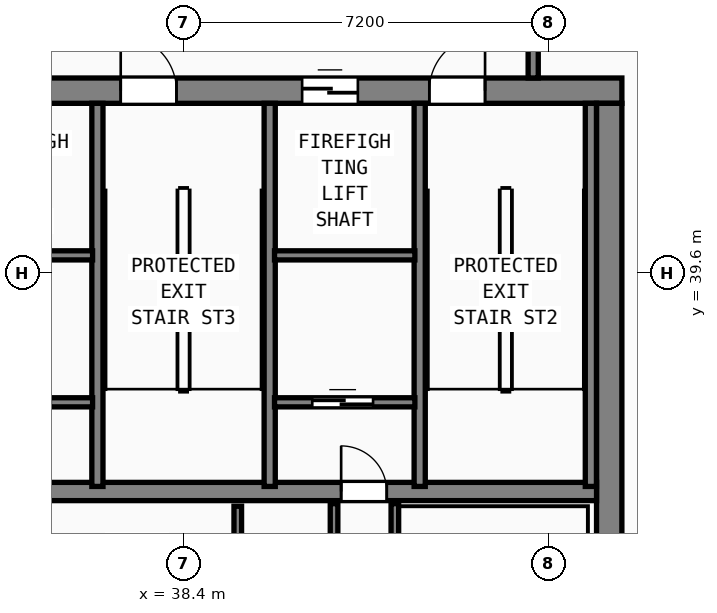
"""IFC4 building model, lengths in metres.
Left out: names, types, materials, properties, quantities, classifications, styles, units other than length and angle.
Written with IfcOpenShell. Run it as: python <this file> out.ifc"""

import sys

from ifc_helpers import new_model, si_unit, direction, frame, frame_2d, origin, place, context, subcontext, project, spatial, rectangle, extrude, element, fill, save


model = new_model("IFC4")
c1 = context("Model", 3, precision=1e-05, world=origin(), true_north=direction((0.0, 1.0)))
c2 = subcontext(c1, "Body", "Model", "MODEL_VIEW")
j1 = project(units=[si_unit("LENGTHUNIT", "METRE"), si_unit("PLANEANGLEUNIT", "RADIAN")], contexts=[c1])
p1 = place(None, origin())
s1 = spatial("IfcSite", under=j1, at=p1, CompositionType="ELEMENT")
p2 = place(p1, origin())
s2 = spatial("IfcBuilding", under=s1, at=p2, CompositionType="ELEMENT")
p3 = place(p2, frame((0.0, 0.0, 323.2)))
s3 = spatial("IfcBuildingStorey", under=s2, at=p3, CompositionType="ELEMENT", Elevation=323.2)
p4 = place(p3, frame((29.75, 43.2, 0.0), z_axis=(0.0, 0.0, 1.0), x_axis=(1.0, 0.0, 0.0)))
e1 = element("IfcWall", 1, at=p4, inside=s3, PredefinedType="SHEAR", context=c2, shape_type="SweptSolid", body=[
    extrude(rectangle(XDim=17.3, YDim=0.5, at=frame_2d((8.65, 0.0))), origin(), (0.0, 0.0, 1.0), 4.75),
])
p5 = place(p4, frame((2.3, 0.0, 0.0)))
e2 = element("IfcOpeningElement", 2, at=p5, cuts=e1, PredefinedType="OPENING", context=c2, shape_type="SweptSolid", body=[
    extrude(rectangle(XDim=1.1, YDim=2.15, at=frame_2d((0.55, 1.075))), frame((0.0, 0.26, 0.0), z_axis=(0.0, -1.0, 0.0), x_axis=(1.0, 0.0, 0.0)), (0.0, 0.0, 1.0), 0.52),
])
p6 = place(p4, frame((7.41, 0.0, 0.0)))
e3 = element("IfcOpeningElement", 3, at=p6, cuts=e1, PredefinedType="OPENING", context=c2, shape_type="SweptSolid", body=[
    extrude(rectangle(XDim=1.1, YDim=2.15, at=frame_2d((0.55, 1.075))), frame((0.0, 0.26, 0.0), z_axis=(0.0, -1.0, 0.0), x_axis=(1.0, 0.0, 0.0)), (0.0, 0.0, 1.0), 0.52),
])
p7 = place(p4, frame((13.5, 0.0, 0.0)))
e4 = element("IfcOpeningElement", 4, at=p7, cuts=e1, PredefinedType="OPENING", context=c2, shape_type="SweptSolid", body=[
    extrude(rectangle(XDim=1.1, YDim=2.15, at=frame_2d((0.55, 1.075))), frame((0.0, 0.26, 0.0), z_axis=(0.0, -1.0, 0.0), x_axis=(1.0, 0.0, 0.0)), (0.0, 0.0, 1.0), 0.52),
])
p8 = place(p4, frame((4.63, 0.0, 0.0)))
e5 = element("IfcOpeningElement", 5, at=p8, cuts=e1, PredefinedType="OPENING", context=c2, shape_type="SweptSolid", body=[
    extrude(rectangle(XDim=1.1, YDim=2.2, at=frame_2d((0.55, 1.1))), frame((0.0, 0.26, 0.0), z_axis=(0.0, -1.0, 0.0), x_axis=(1.0, 0.0, 0.0)), (0.0, 0.0, 1.0), 0.52),
])
p9 = place(p4, frame((10.99, 0.0, 0.0)))
e6 = element("IfcOpeningElement", 6, at=p9, cuts=e1, PredefinedType="OPENING", context=c2, shape_type="SweptSolid", body=[
    extrude(rectangle(XDim=1.1, YDim=2.2, at=frame_2d((0.55, 1.1))), frame((0.0, 0.26, 0.0), z_axis=(0.0, -1.0, 0.0), x_axis=(1.0, 0.0, 0.0)), (0.0, 0.0, 1.0), 0.52),
])
p10 = place(p3, frame((46.8, 32.8, 0.0), z_axis=(0.0, 0.0, 1.0), x_axis=(0.0, 1.0, 0.0)))
e7 = element("IfcWall", 7, at=p10, inside=s3, PredefinedType="SHEAR", context=c2, shape_type="SweptSolid", body=[
    extrude(rectangle(XDim=10.15, YDim=0.5, at=frame_2d((5.075, 0.0))), origin(), (0.0, 0.0, 1.0), 4.75),
])
p11 = place(p3, frame((30.25, 35.29, 0.0), z_axis=(0.0, 0.0, 1.0), x_axis=(1.0, 0.0, 0.0)))
e8 = element("IfcWall", 8, at=p11, inside=s3, PredefinedType="SHEAR", context=c2, shape_type="SweptSolid", body=[
    extrude(rectangle(XDim=16.3, YDim=0.36, at=frame_2d((8.15, 0.0))), origin(), (0.0, 0.0, 1.0), 4.75),
])
p12 = place(p11, frame((5.1, 0.0, 0.0), z_axis=(0.0, 0.0, 1.0), x_axis=(-1.0, 0.0, 0.0)))
e9 = element("IfcOpeningElement", 9, at=p12, cuts=e8, PredefinedType="OPENING", context=c2, shape_type="SweptSolid", body=[
    extrude(rectangle(XDim=0.9, YDim=2.1, at=frame_2d((0.45, 1.05))), frame((0.0, 0.19, 0.0), z_axis=(0.0, -1.0, 0.0), x_axis=(1.0, 0.0, 0.0)), (0.0, 0.0, 1.0), 0.38),
])
p13 = place(p11, frame((12.16, 0.0, 0.0), z_axis=(0.0, 0.0, 1.0), x_axis=(-1.0, 0.0, 0.0)))
e10 = element("IfcOpeningElement", 10, at=p13, cuts=e8, PredefinedType="OPENING", context=c2, shape_type="SweptSolid", body=[
    extrude(rectangle(XDim=0.9, YDim=2.1, at=frame_2d((0.45, 1.05))), frame((0.0, 0.19, 0.0), z_axis=(0.0, -1.0, 0.0), x_axis=(1.0, 0.0, 0.0)), (0.0, 0.0, 1.0), 0.38),
])
for number, where, z_axis, x_axis in (
    (11, (36.7, 35.39, 0.0), (0.0, 0.0, 1.0), (0.0, 1.0, 0.0)),
    (12, (40.1, 35.39, 0.0), (0.0, 0.0, 1.0), (0.0, 1.0, 0.0)),
    (13, (43.06, 35.39, 0.0), (0.0, 0.0, 1.0), (0.0, 1.0, 0.0)),
    (14, (46.438, 35.39, 0.0), (0.0, 0.0, 1.0), (0.0, 1.0, 0.0)),
):
    element("IfcWall", number, at=place(p3, frame(where, z_axis=z_axis, x_axis=x_axis)), inside=s3, PredefinedType="SHEAR", context=c2, shape_type="SweptSolid", body=[
        extrude(rectangle(XDim=7.56, YDim=0.22, at=frame_2d((3.78, 0.0))), origin(), (0.0, 0.0, 1.0), 4.75),
    ])
p14 = place(p3, frame((45.3, 43.45, 0.0), z_axis=(0.0, 0.0, 1.0), x_axis=(0.0, 1.0, 0.0)))
e15 = element("IfcWall", 15, at=p14, inside=s3, PredefinedType="SOLIDWALL", context=c2, shape_type="SweptSolid", body=[
    extrude(rectangle(XDim=2.445, YDim=0.2, at=frame_2d((1.223, 0.0))), origin(), (0.0, 0.0, 1.0), 4.75),
])
p15 = place(p14, frame((0.7, 0.0, 0.0)))
e16 = element("IfcOpeningElement", 16, at=p15, cuts=e15, PredefinedType="OPENING", context=c2, shape_type="SweptSolid", body=[
    extrude(rectangle(XDim=1.1, YDim=2.15, at=frame_2d((0.55, 1.075))), frame((0.0, 0.11, 0.0), z_axis=(0.0, -1.0, 0.0), x_axis=(1.0, 0.0, 0.0)), (0.0, 0.0, 1.0), 0.22),
])
for number, where, z_axis, x_axis in (
    (17, (33.835, 39.95, 0.0), (0.0, 0.0, 1.0), (1.0, 0.0, 0.0)),
    (18, (40.195, 39.95, 0.0), (0.0, 0.0, 1.0), (1.0, 0.0, 0.0)),
):
    element("IfcWall", number, at=place(p3, frame(where, z_axis=z_axis, x_axis=x_axis)), inside=s3, PredefinedType="SOLIDWALL", context=c2, shape_type="SweptSolid", body=[
        extrude(rectangle(XDim=2.77, YDim=0.18, at=frame_2d((1.385, 0.0))), origin(), (0.0, 0.0, 1.0), 4.75),
    ])
p16 = place(p3, frame((33.835, 37.05, 0.0), z_axis=(0.0, 0.0, 1.0), x_axis=(1.0, 0.0, 0.0)))
e19 = element("IfcWall", 19, at=p16, inside=s3, PredefinedType="SOLIDWALL", context=c2, shape_type="SweptSolid", body=[
    extrude(rectangle(XDim=2.77, YDim=0.18, at=frame_2d((1.385, 0.0))), origin(), (0.0, 0.0, 1.0), 4.75),
])
p17 = place(p16, frame((1.945, 0.0, 0.0), z_axis=(0.0, 0.0, 1.0), x_axis=(-1.0, 0.0, 0.0)))
e20 = element("IfcOpeningElement", 20, at=p17, cuts=e19, PredefinedType="OPENING", context=c2, shape_type="SweptSolid", body=[
    extrude(rectangle(XDim=1.2, YDim=2.2, at=frame_2d((0.6, 1.1))), frame((0.0, 0.1, 0.0), z_axis=(0.0, -1.0, 0.0), x_axis=(1.0, 0.0, 0.0)), (0.0, 0.0, 1.0), 0.2),
])
p18 = place(p3, frame((40.195, 37.05, 0.0), z_axis=(0.0, 0.0, 1.0), x_axis=(1.0, 0.0, 0.0)))
e21 = element("IfcWall", 21, at=p18, inside=s3, PredefinedType="SOLIDWALL", context=c2, shape_type="SweptSolid", body=[
    extrude(rectangle(XDim=2.77, YDim=0.18, at=frame_2d((1.385, 0.0))), origin(), (0.0, 0.0, 1.0), 4.75),
])
p19 = place(p18, frame((1.945, 0.0, 0.0), z_axis=(0.0, 0.0, 1.0), x_axis=(-1.0, 0.0, 0.0)))
e22 = element("IfcOpeningElement", 22, at=p19, cuts=e21, PredefinedType="OPENING", context=c2, shape_type="SweptSolid", body=[
    extrude(rectangle(XDim=1.2, YDim=2.2, at=frame_2d((0.6, 1.1))), frame((0.0, 0.1, 0.0), z_axis=(0.0, -1.0, 0.0), x_axis=(1.0, 0.0, 0.0)), (0.0, 0.0, 1.0), 0.2),
])
for number, where, z_axis, x_axis in (
    (23, (41.37, 32.88, 0.0), (0.0, 0.0, 1.0), (0.0, 1.0, 0.0)),
    (24, (42.57, 32.88, 0.0), (0.0, 0.0, 1.0), (0.0, 1.0, 0.0)),
):
    element("IfcWall", number, at=place(p3, frame(where, z_axis=z_axis, x_axis=x_axis)), inside=s3, PredefinedType="SOLIDWALL", context=c2, shape_type="SweptSolid", body=[
        extrude(rectangle(XDim=2.17, YDim=0.15, at=frame_2d((1.085, 0.0))), origin(), (0.0, 0.0, 1.0), 4.75),
    ])
p20 = place(p3, frame((39.47, 32.95, 0.0), z_axis=(0.0, 0.0, 1.0), x_axis=(0.0, 1.0, 0.0)))
e25 = element("IfcWall", 25, at=p20, inside=s3, PredefinedType="SOLIDWALL", context=c2, shape_type="SweptSolid", body=[
    extrude(rectangle(XDim=2.05, YDim=0.15, at=frame_2d((1.025, 0.0))), origin(), (0.0, 0.0, 1.0), 4.75),
])
p21 = place(p6, origin())
e26 = element("IfcDoor", 26, at=p21, inside=s3, OperationType="SINGLE_SWING_LEFT", PredefinedType="DOOR", context=c2, shape_type="SweptSolid", body=[
    extrude(rectangle(XDim=1.1, YDim=2.15, at=frame_2d((0.55, 1.075))), frame((0.0, 0.185, 0.0), z_axis=(0.0, -1.0, 0.0), x_axis=(1.0, 0.0, 0.0)), (0.0, 0.0, 1.0), 0.05),
])
fill(e3, e26)
p22 = place(p7, origin())
e27 = element("IfcDoor", 27, at=p22, inside=s3, OperationType="SINGLE_SWING_RIGHT", PredefinedType="DOOR", context=c2, shape_type="SweptSolid", body=[
    extrude(rectangle(XDim=1.1, YDim=2.15, at=frame_2d((0.55, 1.075))), frame((0.0, 0.185, 0.0), z_axis=(0.0, -1.0, 0.0), x_axis=(1.0, 0.0, 0.0)), (0.0, 0.0, 1.0), 0.05),
])
fill(e4, e27)
p23 = place(p9, origin())
e28 = element("IfcDoor", 28, at=p23, inside=s3, OperationType="SLIDING_TO_LEFT", PredefinedType="DOOR", context=c2, shape_type="SweptSolid", body=[
    extrude(rectangle(XDim=1.1, YDim=2.2, at=frame_2d((0.55, 1.1))), frame((0.0, 0.185, 0.0), z_axis=(0.0, -1.0, 0.0), x_axis=(1.0, 0.0, 0.0)), (0.0, 0.0, 1.0), 0.05),
])
fill(e6, e28)
p24 = place(p19, origin())
e29 = element("IfcDoor", 29, at=p24, inside=s3, OperationType="SLIDING_TO_RIGHT", PredefinedType="DOOR", context=c2, shape_type="SweptSolid", body=[
    extrude(rectangle(XDim=1.2, YDim=2.2, at=frame_2d((0.6, 1.1))), frame((0.0, 0.025, 0.0), z_axis=(0.0, -1.0, 0.0), x_axis=(1.0, 0.0, 0.0)), (0.0, 0.0, 1.0), 0.05),
])
fill(e22, e29)
p25 = place(p13, origin())
e30 = element("IfcDoor", 30, at=p25, inside=s3, OperationType="SINGLE_SWING_RIGHT", PredefinedType="DOOR", context=c2, shape_type="SweptSolid", body=[
    extrude(rectangle(XDim=0.9, YDim=2.1, at=frame_2d((0.45, 1.05))), frame((0.0, 0.025, 0.0), z_axis=(0.0, -1.0, 0.0), x_axis=(1.0, 0.0, 0.0)), (0.0, 0.0, 1.0), 0.05),
])
fill(e10, e30)
save(model, sys.argv[1])
